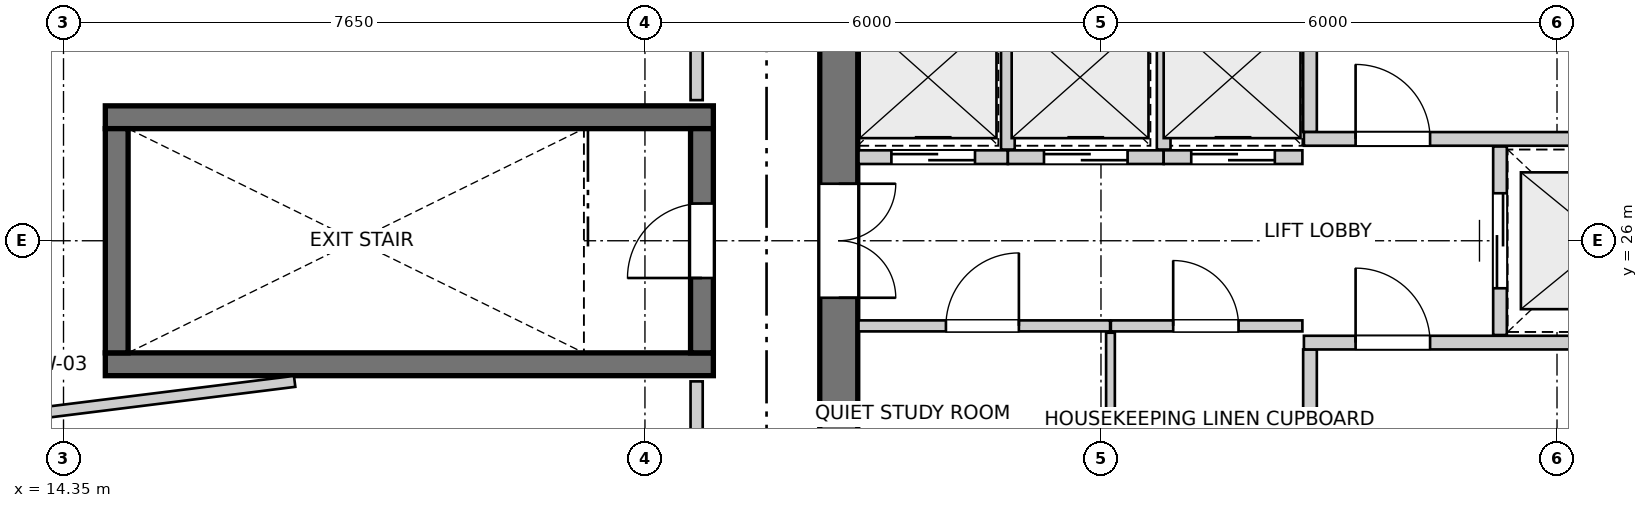
"""IFC4 building model, lengths in metres.
Left out: names, types, materials, properties, quantities, classifications, styles, units other than length and angle.
Written with IfcOpenShell. Run it as: python <this file> out.ifc"""

import sys

from ifc_helpers import new_model, si_unit, direction, frame, frame_2d, origin, place, context, subcontext, project, spatial, rectangle, extrude, source, transform, mapped, element, fill, save


model = new_model("IFC4")
c1 = context("Model", 3, precision=1e-05, world=origin(), true_north=direction((0.0, 1.0)))
c2 = subcontext(c1, "Body", "Model", "MODEL_VIEW")
j1 = project(units=[si_unit("LENGTHUNIT", "METRE"), si_unit("PLANEANGLEUNIT", "RADIAN")], contexts=[c1])
p1 = place(None, origin())
s1 = spatial("IfcSite", under=j1, at=p1, CompositionType="ELEMENT")
p2 = place(p1, origin())
s2 = spatial("IfcBuilding", under=s1, at=p2, CompositionType="ELEMENT")
p3 = place(p2, frame((0.0, 0.0, 250.0)))
s3 = spatial("IfcBuildingStorey", under=s2, at=p3, CompositionType="ELEMENT", Elevation=250.0)
p4 = place(p3, frame((24.55, 33.8, 0.0), z_axis=(0.0, 0.0, 1.0), x_axis=(0.0, -1.0, 0.0)))
e1 = element("IfcWall", 1, at=p4, inside=s3, PredefinedType="SHEAR", context=c2, shape_type="SweptSolid", body=[
    extrude(rectangle(XDim=15.6, YDim=0.5, at=frame_2d((7.8, 0.0))), origin(), (0.0, 0.0, 1.0), 2.95),
])
p5 = place(p4, frame((7.05, 0.0, 0.0)))
e2 = element("IfcOpeningElement", 2, at=p5, cuts=e1, PredefinedType="OPENING", context=c2, shape_type="SweptSolid", body=[
    extrude(rectangle(XDim=1.5, YDim=2.15, at=frame_2d((0.75, 1.075))), frame((0.0, 0.26, 0.0), z_axis=(0.0, -1.0, 0.0), x_axis=(1.0, 0.0, 0.0)), (0.0, 0.0, 1.0), 0.52),
])
p6 = place(p4, frame((3.52, 0.0, 0.0)))
e3 = element("IfcOpeningElement", 3, at=p6, cuts=e1, PredefinedType="OPENING", context=c2, shape_type="SweptSolid", body=[
    extrude(rectangle(XDim=0.86, YDim=2.05, at=frame_2d((0.43, 1.025))), frame((0.0, 0.26, 0.0), z_axis=(0.0, -1.0, 0.0), x_axis=(1.0, 0.0, 0.0)), (0.0, 0.0, 1.0), 0.52),
])
p7 = place(p4, frame((11.22, 0.0, 0.0)))
e4 = element("IfcOpeningElement", 4, at=p7, cuts=e1, PredefinedType="OPENING", context=c2, shape_type="SweptSolid", body=[
    extrude(rectangle(XDim=0.86, YDim=2.05, at=frame_2d((0.43, 1.025))), frame((0.0, 0.26, 0.0), z_axis=(0.0, -1.0, 0.0), x_axis=(1.0, 0.0, 0.0)), (0.0, 0.0, 1.0), 0.52),
])
for number, where, z_axis, x_axis in (
    (5, (14.9, 24.375, 0.0), (0.0, 0.0, 1.0), (1.0, 0.0, 0.0)),
    (6, (22.9, 27.625, 0.0), (0.0, 0.0, 1.0), (-1.0, 0.0, 0.0)),
):
    element("IfcWall", number, at=place(p3, frame(where, z_axis=z_axis, x_axis=x_axis)), inside=s3, PredefinedType="SHEAR", context=c2, shape_type="SweptSolid", body=[
        extrude(rectangle(XDim=8.0, YDim=0.3, at=frame_2d((4.0, 0.0))), origin(), (0.0, 0.0, 1.0), 2.95),
    ])
p8 = place(p3, frame((15.05, 27.475, 0.0), z_axis=(0.0, 0.0, 1.0), x_axis=(0.0, -1.0, 0.0)))
e7 = element("IfcWall", 7, at=p8, inside=s3, PredefinedType="SHEAR", context=c2, shape_type="SweptSolid", body=[
    extrude(rectangle(XDim=2.95, YDim=0.3, at=frame_2d((1.475, 0.0))), origin(), (0.0, 0.0, 1.0), 2.95),
])
p9 = place(p3, frame((22.75, 24.525, 0.0), z_axis=(0.0, 0.0, 1.0), x_axis=(0.0, 1.0, 0.0)))
e8 = element("IfcWall", 8, at=p9, inside=s3, PredefinedType="SHEAR", context=c2, shape_type="SweptSolid", body=[
    extrude(rectangle(XDim=2.95, YDim=0.3, at=frame_2d((1.475, 0.0))), origin(), (0.0, 0.0, 1.0), 2.95),
])
p10 = place(p9, frame((0.985, 0.0, 0.0)))
e9 = element("IfcOpeningElement", 9, at=p10, cuts=e8, PredefinedType="OPENING", context=c2, shape_type="SweptSolid", body=[
    extrude(rectangle(XDim=0.98, YDim=2.15, at=frame_2d((0.49, 1.075))), frame((0.0, 0.16, 0.0), z_axis=(0.0, -1.0, 0.0), x_axis=(1.0, 0.0, 0.0)), (0.0, 0.0, 1.0), 0.32),
])
p11 = place(p3, frame((30.75, 21.46, 0.0), z_axis=(0.0, 0.0, 1.0), x_axis=(0.0, 1.0, 0.0)))
e10 = element("IfcWall", 10, at=p11, inside=s3, PredefinedType="PARTITIONING", context=c2, shape_type="SweptSolid", body=[
    extrude(rectangle(XDim=3.11, YDim=0.18, at=frame_2d((1.555, 0.0))), origin(), (0.0, 0.0, 1.0), 2.95),
])
p12 = place(p11, frame((0.26, 0.0, 0.0)))
e11 = element("IfcOpeningElement", 11, at=p12, cuts=e10, PredefinedType="OPENING", context=c2, shape_type="SweptSolid", body=[
    extrude(rectangle(XDim=0.86, YDim=2.05, at=frame_2d((0.43, 1.025))), frame((0.0, 0.1, 0.0), z_axis=(0.0, -1.0, 0.0), x_axis=(1.0, 0.0, 0.0)), (0.0, 0.0, 1.0), 0.2),
])
p13 = place(p3, frame((30.67, 24.66, 0.0), z_axis=(0.0, 0.0, 1.0), x_axis=(1.0, 0.0, 0.0)))
e12 = element("IfcWall", 12, at=p13, inside=s3, PredefinedType="PARTITIONING", context=c2, shape_type="SweptSolid", body=[
    extrude(rectangle(XDim=5.22, YDim=0.18, at=frame_2d((2.61, 0.0))), origin(), (0.0, 0.0, 1.0), 2.95),
])
p14 = place(p13, frame((0.68, 0.0, 0.0)))
e13 = element("IfcOpeningElement", 13, at=p14, cuts=e12, PredefinedType="OPENING", context=c2, shape_type="SweptSolid", body=[
    extrude(rectangle(XDim=0.98, YDim=2.15, at=frame_2d((0.49, 1.075))), frame((0.0, 0.1, 0.0), z_axis=(0.0, -1.0, 0.0), x_axis=(1.0, 0.0, 0.0)), (0.0, 0.0, 1.0), 0.2),
])
p15 = place(p3, frame((30.75, 27.43, 0.0), z_axis=(0.0, 0.0, 1.0), x_axis=(0.0, 1.0, 0.0)))
e14 = element("IfcWall", 14, at=p15, inside=s3, PredefinedType="PARTITIONING", context=c2, shape_type="SweptSolid", body=[
    extrude(rectangle(XDim=3.11, YDim=0.18, at=frame_2d((1.555, 0.0))), origin(), (0.0, 0.0, 1.0), 2.95),
])
p16 = place(p15, frame((1.98, 0.0, 0.0)))
e15 = element("IfcOpeningElement", 15, at=p16, cuts=e14, PredefinedType="OPENING", context=c2, shape_type="SweptSolid", body=[
    extrude(rectangle(XDim=0.86, YDim=2.05, at=frame_2d((0.43, 1.025))), frame((0.0, 0.1, 0.0), z_axis=(0.0, -1.0, 0.0), x_axis=(1.0, 0.0, 0.0)), (0.0, 0.0, 1.0), 0.2),
])
p17 = place(p3, frame((30.67, 27.34, 0.0), z_axis=(0.0, 0.0, 1.0), x_axis=(1.0, 0.0, 0.0)))
e16 = element("IfcWall", 16, at=p17, inside=s3, PredefinedType="PARTITIONING", context=c2, shape_type="SweptSolid", body=[
    extrude(rectangle(XDim=5.22, YDim=0.18, at=frame_2d((2.61, 0.0))), origin(), (0.0, 0.0, 1.0), 2.95),
])
p18 = place(p17, frame((0.68, 0.0, 0.0)))
e17 = element("IfcOpeningElement", 17, at=p18, cuts=e16, PredefinedType="OPENING", context=c2, shape_type="SweptSolid", body=[
    extrude(rectangle(XDim=0.98, YDim=2.15, at=frame_2d((0.49, 1.075))), frame((0.0, 0.1, 0.0), z_axis=(0.0, -1.0, 0.0), x_axis=(1.0, 0.0, 0.0)), (0.0, 0.0, 1.0), 0.2),
])
p19 = place(p3, frame((33.25, 24.76, 0.0), z_axis=(0.0, 0.0, 1.0), x_axis=(0.0, 1.0, 0.0)))
e18 = element("IfcWall", 18, at=p19, inside=s3, PredefinedType="PARTITIONING", context=c2, shape_type="SweptSolid", body=[
    extrude(rectangle(XDim=2.48, YDim=0.18, at=frame_2d((1.24, 0.0))), origin(), (0.0, 0.0, 1.0), 2.95),
])
p20 = place(p19, frame((0.615, 0.0, 0.0)))
e19 = element("IfcOpeningElement", 19, at=p20, cuts=e18, PredefinedType="OPENING", context=c2, shape_type="SweptSolid", body=[
    extrude(rectangle(XDim=1.25, YDim=2.15, at=frame_2d((0.625, 1.075))), frame((0.0, 0.1, 0.0), z_axis=(0.0, -1.0, 0.0), x_axis=(1.0, 0.0, 0.0)), (0.0, 0.0, 1.0), 0.2),
])
p21 = place(p3, frame((24.81, 24.88, 0.0), z_axis=(0.0, 0.0, 1.0), x_axis=(1.0, 0.0, 0.0)))
e20 = element("IfcWall", 20, at=p21, inside=s3, PredefinedType="PARTITIONING", context=c2, shape_type="SweptSolid", body=[
    extrude(rectangle(XDim=3.31, YDim=0.145, at=frame_2d((1.655, 0.0))), origin(), (0.0, 0.0, 1.0), 2.95),
])
p22 = place(p21, frame((1.15, 0.0, 0.0)))
e21 = element("IfcOpeningElement", 21, at=p22, cuts=e20, PredefinedType="OPENING", context=c2, shape_type="SweptSolid", body=[
    extrude(rectangle(XDim=0.96, YDim=2.1, at=frame_2d((0.48, 1.05))), frame((0.0, 0.083, 0.0), z_axis=(0.0, -1.0, 0.0), x_axis=(1.0, 0.0, 0.0)), (0.0, 0.0, 1.0), 0.165),
])
p23 = place(p3, frame((28.13, 24.88, 0.0), z_axis=(0.0, 0.0, 1.0), x_axis=(1.0, 0.0, 0.0)))
e22 = element("IfcWall", 22, at=p23, inside=s3, PredefinedType="PARTITIONING", context=c2, shape_type="SweptSolid", body=[
    extrude(rectangle(XDim=2.52, YDim=0.145, at=frame_2d((1.26, 0.0))), origin(), (0.0, 0.0, 1.0), 2.95),
])
p24 = place(p23, frame((0.82, 0.0, 0.0)))
e23 = element("IfcOpeningElement", 23, at=p24, cuts=e22, PredefinedType="OPENING", context=c2, shape_type="SweptSolid", body=[
    extrude(rectangle(XDim=0.86, YDim=2.05, at=frame_2d((0.43, 1.025))), frame((0.0, 0.083, 0.0), z_axis=(0.0, -1.0, 0.0), x_axis=(1.0, 0.0, 0.0)), (0.0, 0.0, 1.0), 0.165),
])
p25 = place(p3, frame((28.125, 23.02, 0.0), z_axis=(0.0, 0.0, 1.0), x_axis=(0.0, 1.0, 0.0)))
e24 = element("IfcWall", 24, at=p25, inside=s3, PredefinedType="PARTITIONING", context=c2, shape_type="SweptSolid", body=[
    extrude(rectangle(XDim=1.77, YDim=0.115, at=frame_2d((0.885, 0.0))), origin(), (0.0, 0.0, 1.0), 2.95),
])
p26 = place(p3, frame((24.81, 27.1, 0.0), z_axis=(0.0, 0.0, 1.0), x_axis=(1.0, 0.0, 0.0)))
e25 = element("IfcWall", 25, at=p26, inside=s3, PredefinedType="PARTITIONING", context=c2, shape_type="SweptSolid", body=[
    extrude(rectangle(XDim=1.965, YDim=0.18, at=frame_2d((0.982, 0.0))), origin(), (0.0, 0.0, 1.0), 2.95),
])
p27 = place(p26, frame((0.433, 0.0, 0.0)))
e26 = element("IfcOpeningElement", 26, at=p27, cuts=e25, PredefinedType="OPENING", context=c2, shape_type="SweptSolid", body=[
    extrude(rectangle(XDim=1.1, YDim=2.15, at=frame_2d((0.55, 1.075))), frame((0.0, 0.1, 0.0), z_axis=(0.0, -1.0, 0.0), x_axis=(1.0, 0.0, 0.0)), (0.0, 0.0, 1.0), 0.2),
])
p28 = place(p3, frame((26.775, 27.1, 0.0), z_axis=(0.0, 0.0, 1.0), x_axis=(1.0, 0.0, 0.0)))
e27 = element("IfcWall", 27, at=p28, inside=s3, PredefinedType="PARTITIONING", context=c2, shape_type="SweptSolid", body=[
    extrude(rectangle(XDim=2.05, YDim=0.18, at=frame_2d((1.025, 0.0))), origin(), (0.0, 0.0, 1.0), 2.95),
])
p29 = place(p28, frame((0.475, 0.0, 0.0)))
e28 = element("IfcOpeningElement", 28, at=p29, cuts=e27, PredefinedType="OPENING", context=c2, shape_type="SweptSolid", body=[
    extrude(rectangle(XDim=1.1, YDim=2.15, at=frame_2d((0.55, 1.075))), frame((0.0, 0.1, 0.0), z_axis=(0.0, -1.0, 0.0), x_axis=(1.0, 0.0, 0.0)), (0.0, 0.0, 1.0), 0.2),
])
p30 = place(p3, frame((26.775, 27.2, 0.0), z_axis=(0.0, 0.0, 1.0), x_axis=(0.0, 1.0, 0.0)))
e29 = element("IfcWall", 29, at=p30, inside=s3, PredefinedType="PARTITIONING", context=c2, shape_type="SweptSolid", body=[
    extrude(rectangle(XDim=1.78, YDim=0.18, at=frame_2d((0.89, 0.0))), origin(), (0.0, 0.0, 1.0), 2.95),
])
p31 = place(p3, frame((28.825, 27.1, 0.0), z_axis=(0.0, 0.0, 1.0), x_axis=(1.0, 0.0, 0.0)))
e30 = element("IfcWall", 30, at=p31, inside=s3, PredefinedType="PARTITIONING", context=c2, shape_type="SweptSolid", body=[
    extrude(rectangle(XDim=1.825, YDim=0.18, at=frame_2d((0.913, 0.0))), origin(), (0.0, 0.0, 1.0), 2.95),
])
p32 = place(p31, frame((0.363, 0.0, 0.0)))
e31 = element("IfcOpeningElement", 31, at=p32, cuts=e30, PredefinedType="OPENING", context=c2, shape_type="SweptSolid", body=[
    extrude(rectangle(XDim=1.1, YDim=2.15, at=frame_2d((0.55, 1.075))), frame((0.0, 0.1, 0.0), z_axis=(0.0, -1.0, 0.0), x_axis=(1.0, 0.0, 0.0)), (0.0, 0.0, 1.0), 0.2),
])
p33 = place(p3, frame((28.825, 27.2, 0.0), z_axis=(0.0, 0.0, 1.0), x_axis=(0.0, 1.0, 0.0)))
e32 = element("IfcWall", 32, at=p33, inside=s3, PredefinedType="PARTITIONING", context=c2, shape_type="SweptSolid", body=[
    extrude(rectangle(XDim=1.78, YDim=0.18, at=frame_2d((0.89, 0.0))), origin(), (0.0, 0.0, 1.0), 2.95),
])
p34 = place(p3, frame((22.68, 27.85, 0.0), z_axis=(0.0, 0.0, 1.0), x_axis=(0.0, 1.0, 0.0)))
e33 = element("IfcWall", 33, at=p34, inside=s3, PredefinedType="PARTITIONING", context=c2, shape_type="SweptSolid", body=[
    extrude(rectangle(XDim=4.377, YDim=0.16, at=frame_2d((2.188, 0.0))), origin(), (0.0, 0.0, 1.0), 2.218),
])
p35 = place(p34, frame((1.559, 0.0, 0.0)))
e34 = element("IfcOpeningElement", 34, at=p35, cuts=e33, PredefinedType="OPENING", context=c2, shape_type="SweptSolid", body=[
    extrude(rectangle(XDim=1.3, YDim=2.1, at=frame_2d((0.65, 1.05))), frame((0.0, 0.09, 0.0), z_axis=(0.0, -1.0, 0.0), x_axis=(1.0, 0.0, 0.0)), (0.0, 0.0, 1.0), 0.18),
])
p36 = place(p3, frame((22.68, 20.012, 0.0), z_axis=(0.0, 0.0, 1.0), x_axis=(0.0, 1.0, 0.0)))
e35 = element("IfcWall", 35, at=p36, inside=s3, PredefinedType="PARTITIONING", context=c2, shape_type="SweptSolid", body=[
    extrude(rectangle(XDim=4.138, YDim=0.16, at=frame_2d((2.069, 0.0))), origin(), (0.0, 0.0, 1.0), 2.218),
])
p37 = place(p36, frame((1.466, 0.0, 0.0)))
e36 = element("IfcOpeningElement", 36, at=p37, cuts=e35, PredefinedType="OPENING", context=c2, shape_type="SweptSolid", body=[
    extrude(rectangle(XDim=1.3, YDim=2.1, at=frame_2d((0.65, 1.05))), frame((0.0, 0.09, 0.0), z_axis=(0.0, -1.0, 0.0), x_axis=(1.0, 0.0, 0.0)), (0.0, 0.0, 1.0), 0.18),
])
p38 = place(p3, frame((11.354, 23.398, 0.0), z_axis=(0.0, 0.0, 1.0), x_axis=(0.992337032495, 0.123560567901, 0.0)))
e37 = element("IfcWall", 37, at=p38, inside=s3, PredefinedType="PARTITIONING", context=c2, shape_type="SweptSolid", body=[
    extrude(rectangle(XDim=6.084, YDim=0.145, at=frame_2d((3.042, 0.0))), origin(), (0.0, 0.0, 1.0), 2.95),
])
m1 = source(origin(), c2, "Body", "SweptSolid", [
    extrude(rectangle(XDim=0.98, YDim=2.15, at=frame_2d((0.49, 1.075))), frame((0.0, 0.025, 0.0), z_axis=(0.0, -1.0, 0.0), x_axis=(1.0, 0.0, 0.0)), (0.0, 0.0, 1.0), 0.05),
])
p39 = place(p10, origin())
e38 = element("IfcDoor", 38, at=p39, inside=s3, OperationType="SINGLE_SWING_LEFT", PredefinedType="DOOR", context=c2, shape_type="MappedRepresentation", body=[
    mapped(m1, transform((0.0, 0.0, 0.0), x_axis=(1.0, 0.0, 0.0), y_axis=(0.0, 1.0, 0.0), z_axis=(0.0, 0.0, 1.0), scale=1.0)),
])
fill(e9, e38)
m2 = source(origin(), c2, "Body", "SweptSolid", [
    extrude(rectangle(XDim=1.5, YDim=2.15, at=frame_2d((0.75, 1.075))), frame((0.0, 0.025, 0.0), z_axis=(0.0, -1.0, 0.0), x_axis=(1.0, 0.0, 0.0)), (0.0, 0.0, 1.0), 0.05),
])
p40 = place(p5, origin())
e39 = element("IfcDoor", 39, at=p40, inside=s3, OperationType="DOUBLE_DOOR_SINGLE_SWING", PredefinedType="DOOR", context=c2, shape_type="MappedRepresentation", body=[
    mapped(m2, transform((0.0, 0.0, 0.0), x_axis=(1.0, 0.0, 0.0), y_axis=(0.0, 1.0, 0.0), z_axis=(0.0, 0.0, 1.0), scale=1.0)),
])
fill(e2, e39)
p41 = place(p14, origin())
e40 = element("IfcDoor", 40, at=p41, inside=s3, OperationType="SINGLE_SWING_LEFT", PredefinedType="DOOR", context=c2, shape_type="MappedRepresentation", body=[
    mapped(m1, transform((0.0, 0.0, 0.0), x_axis=(1.0, 0.0, 0.0), y_axis=(0.0, 1.0, 0.0), z_axis=(0.0, 0.0, 1.0), scale=1.0)),
])
fill(e13, e40)
p42 = place(p18, origin())
e41 = element("IfcDoor", 41, at=p42, inside=s3, OperationType="SINGLE_SWING_LEFT", PredefinedType="DOOR", context=c2, shape_type="MappedRepresentation", body=[
    mapped(m1, transform((0.0, 0.0, 0.0), x_axis=(1.0, 0.0, 0.0), y_axis=(0.0, 1.0, 0.0), z_axis=(0.0, 0.0, 1.0), scale=1.0)),
])
fill(e17, e41)
m3 = source(origin(), c2, "Body", "SweptSolid", [
    extrude(rectangle(XDim=1.25, YDim=2.15, at=frame_2d((0.625, 1.075))), frame((0.0, 0.025, 0.0), z_axis=(0.0, -1.0, 0.0), x_axis=(1.0, 0.0, 0.0)), (0.0, 0.0, 1.0), 0.05),
])
p43 = place(p20, origin())
e42 = element("IfcDoor", 42, at=p43, inside=s3, OperationType="DOUBLE_DOOR_SLIDING", PredefinedType="DOOR", context=c2, shape_type="MappedRepresentation", body=[
    mapped(m3, transform((0.0, 0.0, 0.0), x_axis=(1.0, 0.0, 0.0), y_axis=(0.0, 1.0, 0.0), z_axis=(0.0, 0.0, 1.0), scale=1.0)),
])
fill(e19, e42)
m4 = source(origin(), c2, "Body", "SweptSolid", [
    extrude(rectangle(XDim=0.96, YDim=2.1, at=frame_2d((0.48, 1.05))), frame((0.0, 0.025, 0.0), z_axis=(0.0, -1.0, 0.0), x_axis=(1.0, 0.0, 0.0)), (0.0, 0.0, 1.0), 0.05),
])
p44 = place(p22, origin())
e43 = element("IfcDoor", 43, at=p44, inside=s3, OperationType="SINGLE_SWING_RIGHT", PredefinedType="DOOR", context=c2, shape_type="MappedRepresentation", body=[
    mapped(m4, transform((0.0, 0.0, 0.0), x_axis=(1.0, 0.0, 0.0), y_axis=(0.0, 1.0, 0.0), z_axis=(0.0, 0.0, 1.0), scale=1.0)),
])
fill(e21, e43)
m5 = source(origin(), c2, "Body", "SweptSolid", [
    extrude(rectangle(XDim=0.86, YDim=2.05, at=frame_2d((0.43, 1.025))), frame((0.0, 0.025, 0.0), z_axis=(0.0, -1.0, 0.0), x_axis=(1.0, 0.0, 0.0)), (0.0, 0.0, 1.0), 0.05),
])
p45 = place(p24, origin())
e44 = element("IfcDoor", 44, at=p45, inside=s3, OperationType="SINGLE_SWING_LEFT", PredefinedType="DOOR", context=c2, shape_type="MappedRepresentation", body=[
    mapped(m5, transform((0.0, 0.0, 0.0), x_axis=(1.0, 0.0, 0.0), y_axis=(0.0, 1.0, 0.0), z_axis=(0.0, 0.0, 1.0), scale=1.0)),
])
fill(e23, e44)
m6 = source(origin(), c2, "Body", "SweptSolid", [
    extrude(rectangle(XDim=1.1, YDim=2.15, at=frame_2d((0.55, 1.075))), frame((0.0, 0.025, 0.0), z_axis=(0.0, -1.0, 0.0), x_axis=(1.0, 0.0, 0.0)), (0.0, 0.0, 1.0), 0.05),
])
p46 = place(p27, origin())
e45 = element("IfcDoor", 45, at=p46, inside=s3, OperationType="DOUBLE_DOOR_SLIDING", PredefinedType="DOOR", context=c2, shape_type="MappedRepresentation", body=[
    mapped(m6, transform((0.0, 0.0, 0.0), x_axis=(1.0, 0.0, 0.0), y_axis=(0.0, 1.0, 0.0), z_axis=(0.0, 0.0, 1.0), scale=1.0)),
])
fill(e26, e45)
p47 = place(p29, origin())
e46 = element("IfcDoor", 46, at=p47, inside=s3, OperationType="DOUBLE_DOOR_SLIDING", PredefinedType="DOOR", context=c2, shape_type="MappedRepresentation", body=[
    mapped(m6, transform((0.0, 0.0, 0.0), x_axis=(1.0, 0.0, 0.0), y_axis=(0.0, 1.0, 0.0), z_axis=(0.0, 0.0, 1.0), scale=1.0)),
])
fill(e28, e46)
p48 = place(p32, origin())
e47 = element("IfcDoor", 47, at=p48, inside=s3, OperationType="DOUBLE_DOOR_SLIDING", PredefinedType="DOOR", context=c2, shape_type="MappedRepresentation", body=[
    mapped(m6, transform((0.0, 0.0, 0.0), x_axis=(1.0, 0.0, 0.0), y_axis=(0.0, 1.0, 0.0), z_axis=(0.0, 0.0, 1.0), scale=1.0)),
])
fill(e31, e47)
save(model, sys.argv[1])
